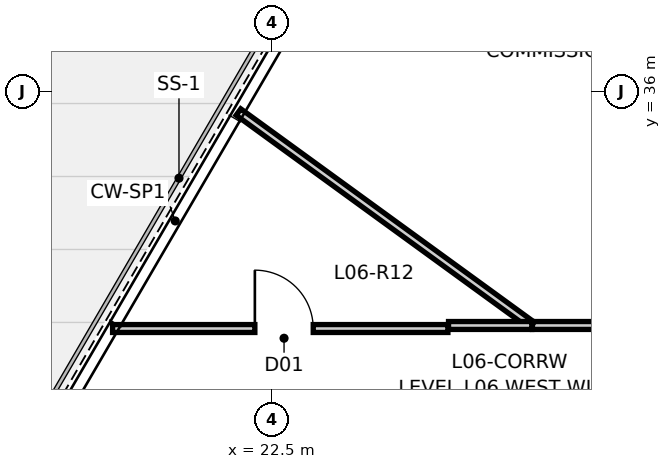
"""IFC4 building model, lengths in metres.
Left out: names, types, materials, properties, quantities, classifications, styles, units other than length and angle.
Written with IfcOpenShell. Run it as: python <this file> out.ifc"""

import sys

from ifc_helpers import new_model, si_unit, direction, frame, frame_2d, origin, place, context, subcontext, project, spatial, rectangle, extrude, element, fill, save


model = new_model("IFC4")
c1 = context("Model", 3, precision=1e-05, world=origin(), true_north=direction((0.0, 1.0)))
c2 = subcontext(c1, "Body", "Model", "MODEL_VIEW")
j1 = project(units=[si_unit("LENGTHUNIT", "METRE"), si_unit("PLANEANGLEUNIT", "RADIAN")], contexts=[c1])
p1 = place(None, origin())
s1 = spatial("IfcSite", under=j1, at=p1, CompositionType="ELEMENT")
p2 = place(p1, origin())
s2 = spatial("IfcBuilding", under=s1, at=p2, CompositionType="ELEMENT")
p3 = place(p2, frame((0.0, 0.0, 27.6)))
s3 = spatial("IfcBuildingStorey", under=s2, at=p3, CompositionType="ELEMENT", Elevation=27.6)
p4 = place(p3, frame((26.785, 32.15, 0.0), z_axis=(0.0, 0.0, 1.0), x_axis=(1.0, 0.0, 0.0)))
e1 = element("IfcWall", 1, at=p4, inside=s3, PredefinedType="PARTITIONING", context=c2, shape_type="SweptSolid", body=[
    extrude(rectangle(XDim=8.4, YDim=0.13, at=frame_2d((4.2, 0.0))), origin(), (0.0, 0.0, 1.0), 3.4),
])
p5 = place(p4, frame((3.72, 0.0, 0.0)))
e2 = element("IfcOpeningElement", 2, at=p5, cuts=e1, PredefinedType="OPENING", context=c2, shape_type="SweptSolid", body=[
    extrude(rectangle(XDim=0.96, YDim=2.15, at=frame_2d((0.48, 1.075))), frame((0.0, 0.077, 0.0), z_axis=(0.0, -1.0, 0.0), x_axis=(1.0, 0.0, 0.0)), (0.0, 0.0, 1.0), 0.154),
])
p6 = place(p3, frame((21.95, 35.66, 0.0), z_axis=(0.0, 0.0, 1.0), x_axis=(0.808969626328, -0.587850443293, 0.0)))
e3 = element("IfcWall", 3, at=p6, inside=s3, PredefinedType="PARTITIONING", context=c2, shape_type="SweptSolid", body=[
    extrude(rectangle(XDim=5.966, YDim=0.13, at=frame_2d((2.983, 0.0))), origin(), (0.0, 0.0, 1.0), 3.4),
])
p7 = place(p3, frame((19.88, 32.1, 0.0), z_axis=(0.0, 0.0, 1.0), x_axis=(1.0, 0.0, 0.0)))
e4 = element("IfcWall", 4, at=p7, inside=s3, PredefinedType="PARTITIONING", context=c2, shape_type="SweptSolid", body=[
    extrude(rectangle(XDim=5.515, YDim=0.13, at=frame_2d((2.758, 0.0))), origin(), (0.0, 0.0, 1.0), 3.4),
])
p8 = place(p7, frame((2.34, 0.0, 0.0)))
e5 = element("IfcOpeningElement", 5, at=p8, cuts=e4, PredefinedType="OPENING", context=c2, shape_type="SweptSolid", body=[
    extrude(rectangle(XDim=0.96, YDim=2.15, at=frame_2d((0.48, 1.075))), frame((0.0, 0.077, 0.0), z_axis=(0.0, -1.0, 0.0), x_axis=(1.0, 0.0, 0.0)), (0.0, 0.0, 1.0), 0.154),
])
p9 = place(p3, frame((25.405, 32.15, 0.0), z_axis=(0.0, 0.0, 1.0), x_axis=(1.0, 0.0, 0.0)))
e6 = element("IfcWall", 6, at=p9, inside=s3, PredefinedType="PARTITIONING", context=c2, shape_type="SweptSolid", body=[
    extrude(rectangle(XDim=1.37, YDim=0.13, at=frame_2d((0.685, 0.0))), origin(), (0.0, 0.0, 1.0), 3.4),
])
p10 = place(p8, origin())
e7 = element("IfcDoor", 7, at=p10, inside=s3, OperationType="SINGLE_SWING_LEFT", PredefinedType="DOOR", context=c2, shape_type="SweptSolid", body=[
    extrude(rectangle(XDim=0.96, YDim=2.15, at=frame_2d((0.48, 1.075))), frame((0.0, 0.025, 0.0), z_axis=(0.0, -1.0, 0.0), x_axis=(1.0, 0.0, 0.0)), (0.0, 0.0, 1.0), 0.05),
])
fill(e5, e7)
save(model, sys.argv[1])
